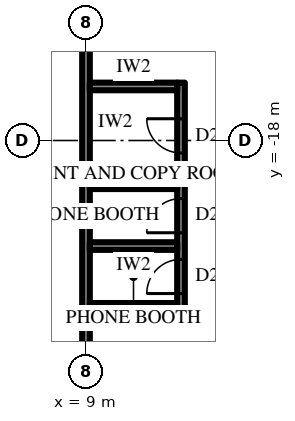
"""IFC4 building model, lengths in metres.
Left out: names, types, materials, properties, quantities, classifications, styles, units other than length and angle.
Written with IfcOpenShell. Run it as: python <this file> out.ifc"""

import sys

from ifc_helpers import new_model, si_unit, direction, frame, frame_2d, origin, place, context, subcontext, project, spatial, rectangle, extrude, element, fill, save


model = new_model("IFC4")
c1 = context("Model", 3, precision=1e-05, world=origin(), true_north=direction((0.0, 1.0)))
c2 = subcontext(c1, "Body", "Model", "MODEL_VIEW")
j1 = project(units=[si_unit("LENGTHUNIT", "METRE"), si_unit("PLANEANGLEUNIT", "RADIAN")], contexts=[c1])
p1 = place(None, origin())
s1 = spatial("IfcSite", under=j1, at=p1, CompositionType="ELEMENT")
p2 = place(p1, origin())
s2 = spatial("IfcBuilding", under=s1, at=p2, CompositionType="ELEMENT")
p3 = place(p2, frame((0.0, 0.0, 311.5)))
s3 = spatial("IfcBuildingStorey", under=s2, at=p3, CompositionType="ELEMENT", Elevation=311.5)
p4 = place(p3, frame((9.0, -12.3, 0.0), z_axis=(0.0, 0.0, 1.0), x_axis=(0.0, -1.0, 0.0)))
e1 = element("IfcWall", 1, at=p4, inside=s3, PredefinedType="PARTITIONING", context=c2, shape_type="SweptSolid", body=[
    extrude(rectangle(XDim=13.05, YDim=0.2, at=frame_2d((6.525, 0.0))), origin(), (0.0, 0.0, 1.0), 4.0),
])
p5 = place(p4, frame((0.805, 0.0, 0.0)))
e2 = element("IfcOpeningElement", 2, at=p5, cuts=e1, PredefinedType="OPENING", context=c2, shape_type="SweptSolid", body=[
    extrude(rectangle(XDim=1.0, YDim=2.2, at=frame_2d((0.5, 1.1))), frame((0.0, 0.11, 0.0), z_axis=(0.0, -1.0, 0.0), x_axis=(1.0, 0.0, 0.0)), (0.0, 0.0, 1.0), 0.22),
])
p6 = place(p3, frame((11.5, -16.478, 0.0), z_axis=(0.0, 0.0, 1.0), x_axis=(0.0, -1.0, 0.0)))
e3 = element("IfcWall", 3, at=p6, inside=s3, PredefinedType="PARTITIONING", context=c2, shape_type="SweptSolid", body=[
    extrude(rectangle(XDim=6.0, YDim=0.2, at=frame_2d((3.0, 0.0))), origin(), (0.0, 0.0, 1.0), 4.0),
])
p7 = place(p6, frame((0.95, 0.0, 0.0)))
e4 = element("IfcOpeningElement", 4, at=p7, cuts=e3, PredefinedType="OPENING", context=c2, shape_type="SweptSolid", body=[
    extrude(rectangle(XDim=0.9, YDim=2.2, at=frame_2d((0.45, 1.1))), frame((0.0, 0.11, 0.0), z_axis=(0.0, -1.0, 0.0), x_axis=(1.0, 0.0, 0.0)), (0.0, 0.0, 1.0), 0.22),
])
p8 = place(p6, frame((3.05, 0.0, 0.0)))
e5 = element("IfcOpeningElement", 5, at=p8, cuts=e3, PredefinedType="OPENING", context=c2, shape_type="SweptSolid", body=[
    extrude(rectangle(XDim=0.9, YDim=2.2, at=frame_2d((0.45, 1.1))), frame((0.0, 0.11, 0.0), z_axis=(0.0, -1.0, 0.0), x_axis=(1.0, 0.0, 0.0)), (0.0, 0.0, 1.0), 0.22),
])
p9 = place(p6, frame((4.65, 0.0, 0.0)))
e6 = element("IfcOpeningElement", 6, at=p9, cuts=e3, PredefinedType="OPENING", context=c2, shape_type="SweptSolid", body=[
    extrude(rectangle(XDim=0.9, YDim=2.2, at=frame_2d((0.45, 1.1))), frame((0.0, 0.11, 0.0), z_axis=(0.0, -1.0, 0.0), x_axis=(1.0, 0.0, 0.0)), (0.0, 0.0, 1.0), 0.22),
])
for number, where, z_axis, x_axis in (
    (7, (9.1, -16.577, 0.0), (0.0, 0.0, 1.0), (1.0, 0.0, 0.0)),
    (8, (9.1, -19.177, 0.0), (0.0, 0.0, 1.0), (1.0, 0.0, 0.0)),
    (9, (9.1, -20.778, 0.0), (0.0, 0.0, 1.0), (1.0, 0.0, 0.0)),
    (10, (9.1, -22.377, 0.0), (0.0, 0.0, 1.0), (1.0, 0.0, 0.0)),
):
    element("IfcWall", number, at=place(p3, frame(where, z_axis=z_axis, x_axis=x_axis)), inside=s3, PredefinedType="PARTITIONING", context=c2, shape_type="SweptSolid", body=[
        extrude(rectangle(XDim=2.3, YDim=0.2, at=frame_2d((1.15, 0.0))), origin(), (0.0, 0.0, 1.0), 4.0),
    ])
p10 = place(p7, frame((0.9, 0.0, 0.0), z_axis=(0.0, 0.0, 1.0), x_axis=(-1.0, 0.0, 0.0)))
e11 = element("IfcDoor", 11, at=p10, inside=s3, OperationType="SINGLE_SWING_LEFT", PredefinedType="DOOR", context=c2, shape_type="SweptSolid", body=[
    extrude(rectangle(XDim=0.9, YDim=2.2, at=frame_2d((0.45, 1.1))), frame((0.0, 0.025, 0.0), z_axis=(0.0, -1.0, 0.0), x_axis=(1.0, 0.0, 0.0)), (0.0, 0.0, 1.0), 0.05),
])
fill(e4, e11)
p11 = place(p8, frame((0.9, 0.0, 0.0), z_axis=(0.0, 0.0, 1.0), x_axis=(-1.0, 0.0, 0.0)))
e12 = element("IfcDoor", 12, at=p11, inside=s3, OperationType="SINGLE_SWING_RIGHT", PredefinedType="DOOR", context=c2, shape_type="SweptSolid", body=[
    extrude(rectangle(XDim=0.9, YDim=2.2, at=frame_2d((0.45, 1.1))), frame((0.0, 0.025, 0.0), z_axis=(0.0, -1.0, 0.0), x_axis=(1.0, 0.0, 0.0)), (0.0, 0.0, 1.0), 0.05),
])
fill(e5, e12)
p12 = place(p9, frame((0.9, 0.0, 0.0), z_axis=(0.0, 0.0, 1.0), x_axis=(-1.0, 0.0, 0.0)))
e13 = element("IfcDoor", 13, at=p12, inside=s3, OperationType="SINGLE_SWING_RIGHT", PredefinedType="DOOR", context=c2, shape_type="SweptSolid", body=[
    extrude(rectangle(XDim=0.9, YDim=2.2, at=frame_2d((0.45, 1.1))), frame((0.0, 0.025, 0.0), z_axis=(0.0, -1.0, 0.0), x_axis=(1.0, 0.0, 0.0)), (0.0, 0.0, 1.0), 0.05),
])
fill(e6, e13)
save(model, sys.argv[1])
